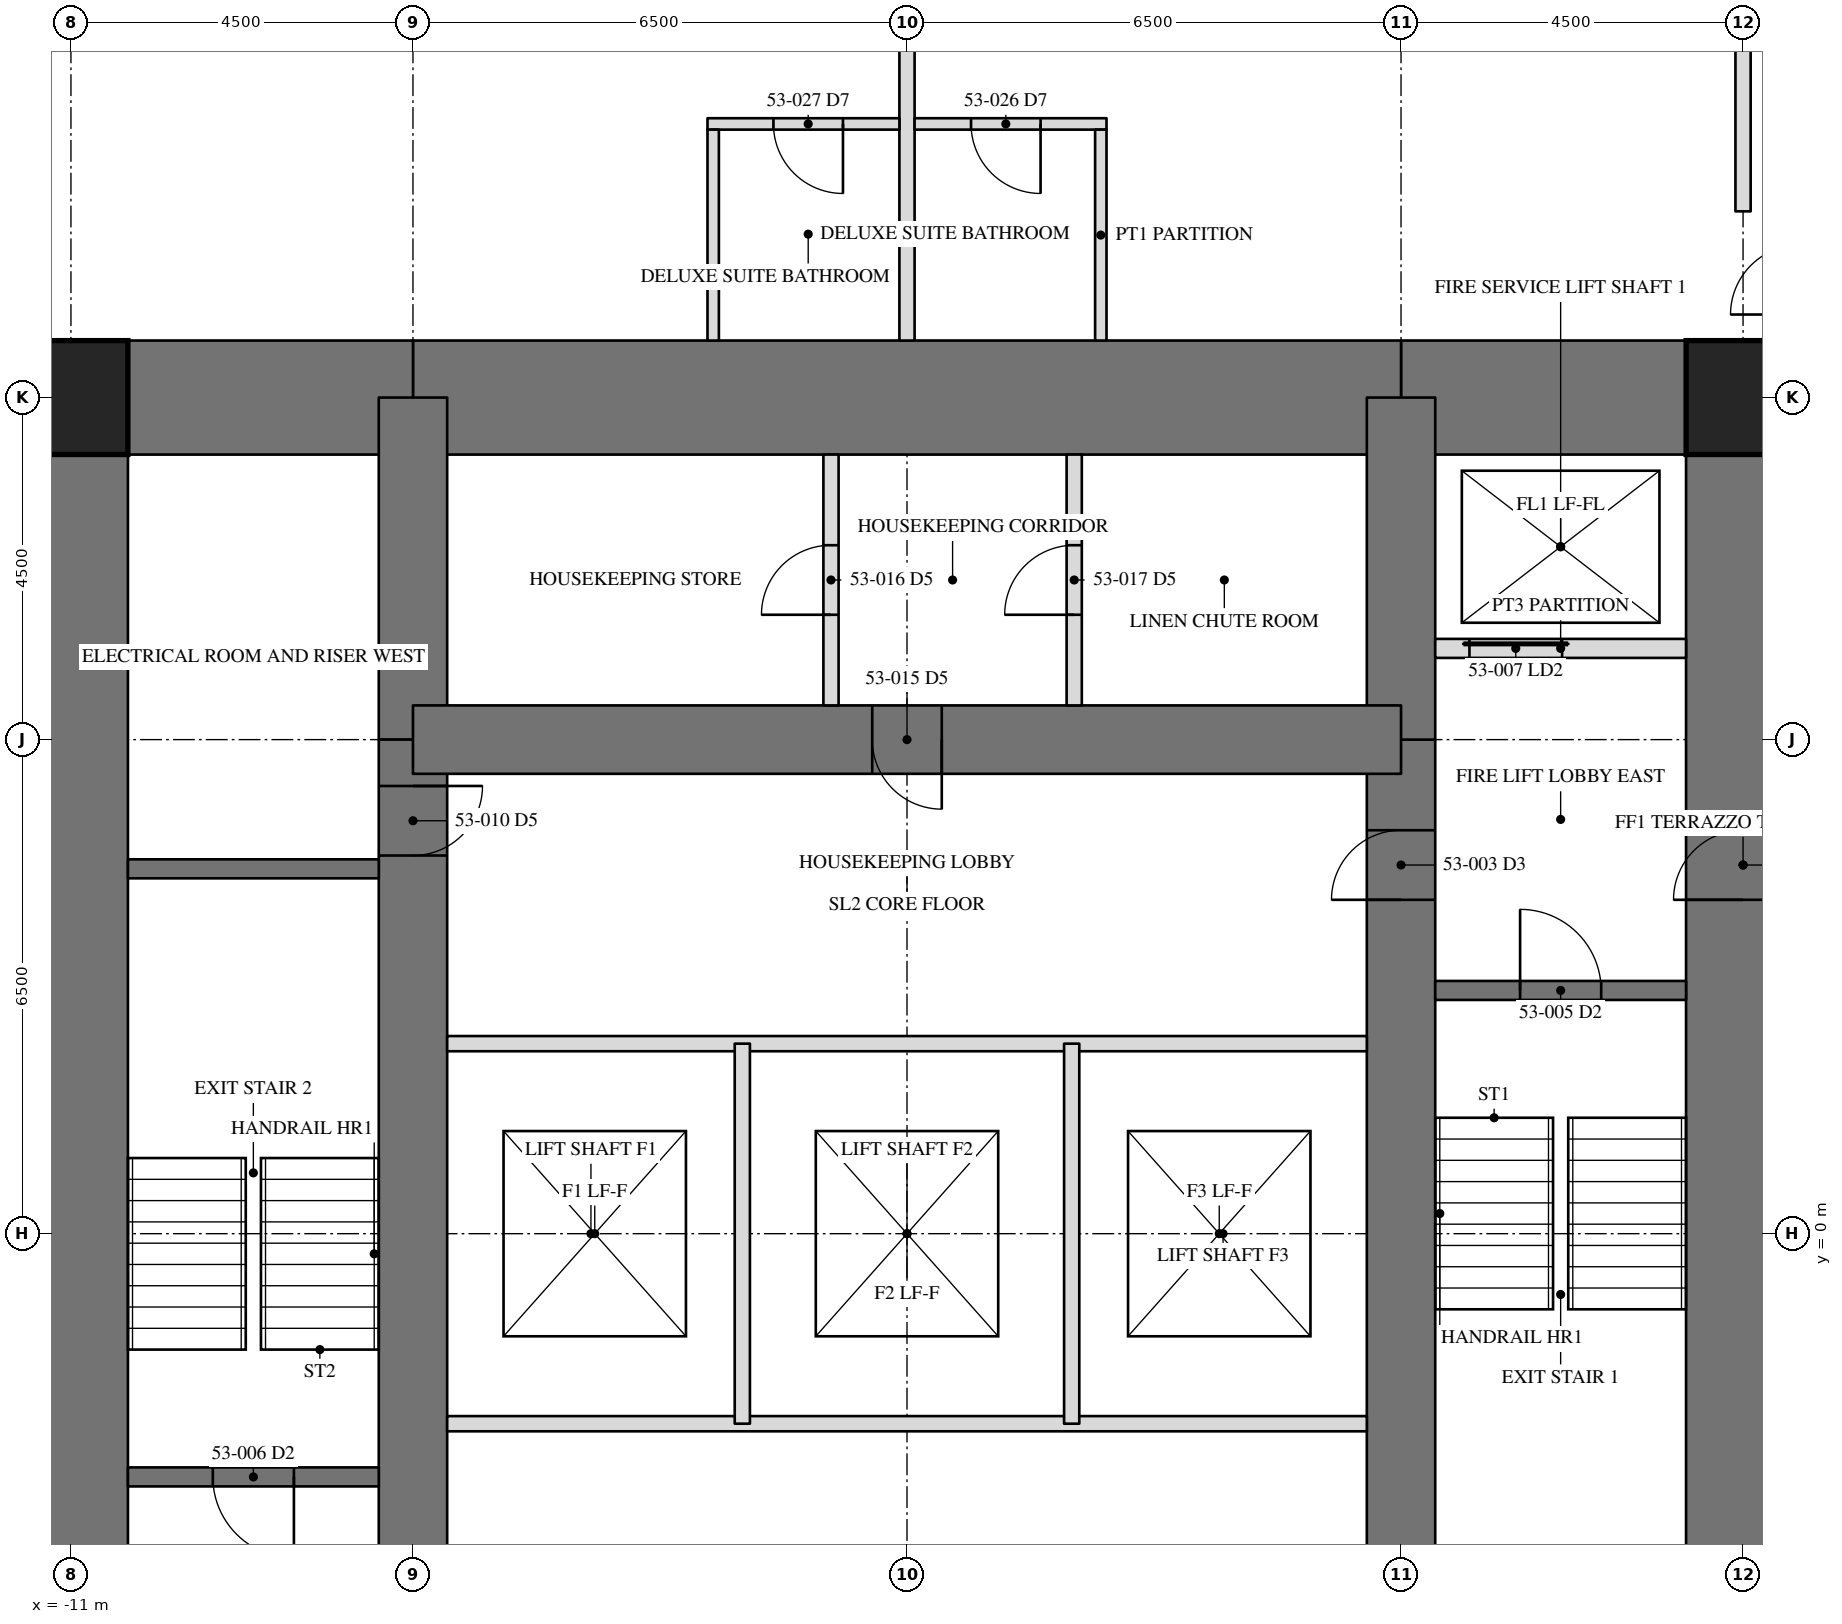
"""IFC4 building model, lengths in metres.
Left out: names, types, materials, properties, quantities, classifications, styles, units other than length and angle.
Written with IfcOpenShell. Run it as: python <this file> out.ifc"""

import sys

from ifc_helpers import new_model, si_unit, direction, frame, frame_2d, origin, origin_2d, place, context, subcontext, project, spatial, rectangle, hollow_rectangle, extrude, element, fill, save


model = new_model("IFC4")
c1 = context("Model", 3, precision=1e-05, world=origin(), true_north=direction((0.0, 1.0)))
c2 = subcontext(c1, "Body", "Model", "MODEL_VIEW")
j1 = project(units=[si_unit("LENGTHUNIT", "METRE"), si_unit("PLANEANGLEUNIT", "RADIAN")], contexts=[c1])
p1 = place(None, origin())
s1 = spatial("IfcSite", under=j1, at=p1, CompositionType="ELEMENT")
p2 = place(p1, origin())
s2 = spatial("IfcBuilding", under=s1, at=p2, CompositionType="ELEMENT")
p3 = place(p2, frame((0.0, 0.0, 222.2)))
s3 = spatial("IfcBuildingStorey", under=s2, at=p3, CompositionType="ELEMENT", Elevation=222.2)
p4 = place(p3, frame((11.0, -11.0, 0.0), z_axis=(0.0, 0.0, 1.0), x_axis=(0.0, 1.0, 0.0)))
e1 = element("IfcWall", 1, at=p4, inside=s3, PredefinedType="SHEAR", context=c2, shape_type="SweptSolid", body=[
    extrude(rectangle(XDim=22.0, YDim=1.5, at=frame_2d((11.0, 0.0))), origin(), (0.0, 0.0, 1.0), 3.5),
])
p5 = place(p4, frame((15.393, 0.0, 0.0)))
e2 = element("IfcOpeningElement", 2, at=p5, cuts=e1, PredefinedType="OPENING", context=c2, shape_type="SweptSolid", body=[
    extrude(rectangle(XDim=0.915, YDim=2.134, at=frame_2d((0.458, 1.067))), frame((0.0, 0.76, 0.0), z_axis=(0.0, -1.0, 0.0), x_axis=(1.0, 0.0, 0.0)), (0.0, 0.0, 1.0), 1.52),
])
p6 = place(p3, frame((-11.0, 11.0, 0.0), z_axis=(0.0, 0.0, 1.0), x_axis=(0.0, -1.0, 0.0)))
e3 = element("IfcWall", 3, at=p6, inside=s3, PredefinedType="SHEAR", context=c2, shape_type="SweptSolid", body=[
    extrude(rectangle(XDim=22.0, YDim=1.5, at=frame_2d((11.0, 0.0))), origin(), (0.0, 0.0, 1.0), 3.5),
])
p7 = place(p6, frame((15.393, 0.0, 0.0)))
e4 = element("IfcOpeningElement", 4, at=p7, cuts=e3, PredefinedType="OPENING", context=c2, shape_type="SweptSolid", body=[
    extrude(rectangle(XDim=0.915, YDim=2.134, at=frame_2d((0.458, 1.067))), frame((0.0, 0.76, 0.0), z_axis=(0.0, -1.0, 0.0), x_axis=(1.0, 0.0, 0.0)), (0.0, 0.0, 1.0), 1.52),
])
p8 = place(p3, frame((11.0, 11.0, 0.0), z_axis=(0.0, 0.0, 1.0), x_axis=(-1.0, 0.0, 0.0)))
e5 = element("IfcWall", 5, at=p8, inside=s3, PredefinedType="SHEAR", context=c2, shape_type="SweptSolid", body=[
    extrude(rectangle(XDim=4.5, YDim=1.5, at=frame_2d((2.25, 0.0))), origin(), (0.0, 0.0, 1.0), 3.5),
])
p9 = place(p3, frame((6.5, 11.0, 0.0), z_axis=(0.0, 0.0, 1.0), x_axis=(-1.0, 0.0, 0.0)))
e6 = element("IfcWall", 6, at=p9, inside=s3, PredefinedType="SHEAR", context=c2, shape_type="SweptSolid", body=[
    extrude(rectangle(XDim=13.0, YDim=1.5, at=frame_2d((6.5, 0.0))), origin(), (0.0, 0.0, 1.0), 3.5),
])
p10 = place(p3, frame((-6.5, 11.0, 0.0), z_axis=(0.0, 0.0, 1.0), x_axis=(-1.0, 0.0, 0.0)))
e7 = element("IfcWall", 7, at=p10, inside=s3, PredefinedType="SHEAR", context=c2, shape_type="SweptSolid", body=[
    extrude(rectangle(XDim=4.5, YDim=1.5, at=frame_2d((2.25, 0.0))), origin(), (0.0, 0.0, 1.0), 3.5),
])
p11 = place(p3, frame((6.5, -6.5, 0.0), z_axis=(0.0, 0.0, 1.0), x_axis=(0.0, 1.0, 0.0)))
e8 = element("IfcWall", 8, at=p11, inside=s3, PredefinedType="SHEAR", context=c2, shape_type="SweptSolid", body=[
    extrude(rectangle(XDim=13.0, YDim=0.9, at=frame_2d((6.5, 0.0))), origin(), (0.0, 0.0, 1.0), 3.5),
])
p12 = place(p11, frame((10.893, 0.0, 0.0)))
e9 = element("IfcOpeningElement", 9, at=p12, cuts=e8, PredefinedType="OPENING", context=c2, shape_type="SweptSolid", body=[
    extrude(rectangle(XDim=0.915, YDim=2.134, at=frame_2d((0.458, 1.067))), frame((0.0, 0.46, 0.0), z_axis=(0.0, -1.0, 0.0), x_axis=(1.0, 0.0, 0.0)), (0.0, 0.0, 1.0), 0.92),
])
p13 = place(p11, frame((0.61, 0.0, 0.0)))
e10 = element("IfcOpeningElement", 10, at=p13, cuts=e8, PredefinedType="OPENING", context=c2, shape_type="SweptSolid", body=[
    extrude(rectangle(XDim=0.915, YDim=2.134, at=frame_2d((0.458, 1.067))), frame((0.0, 0.46, 0.0), z_axis=(0.0, -1.0, 0.0), x_axis=(1.0, 0.0, 0.0)), (0.0, 0.0, 1.0), 0.92),
])
for number, where, z_axis, x_axis in (
    (11, (6.5, 6.5, 0.0), (0.0, 0.0, 1.0), (0.0, 1.0, 0.0)),
    (12, (-6.5, 11.0, 0.0), (0.0, 0.0, 1.0), (0.0, -1.0, 0.0)),
):
    element("IfcWall", number, at=place(p3, frame(where, z_axis=z_axis, x_axis=x_axis)), inside=s3, PredefinedType="SHEAR", context=c2, shape_type="SweptSolid", body=[
        extrude(rectangle(XDim=4.5, YDim=0.9, at=frame_2d((2.25, 0.0))), origin(), (0.0, 0.0, 1.0), 3.5),
    ])
p14 = place(p3, frame((-6.5, 6.5, 0.0), z_axis=(0.0, 0.0, 1.0), x_axis=(0.0, -1.0, 0.0)))
e13 = element("IfcWall", 13, at=p14, inside=s3, PredefinedType="SHEAR", context=c2, shape_type="SweptSolid", body=[
    extrude(rectangle(XDim=13.0, YDim=0.9, at=frame_2d((6.5, 0.0))), origin(), (0.0, 0.0, 1.0), 3.5),
])
p15 = place(p14, frame((10.893, 0.0, 0.0)))
e14 = element("IfcOpeningElement", 14, at=p15, cuts=e13, PredefinedType="OPENING", context=c2, shape_type="SweptSolid", body=[
    extrude(rectangle(XDim=0.915, YDim=2.134, at=frame_2d((0.458, 1.067))), frame((0.0, 0.46, 0.0), z_axis=(0.0, -1.0, 0.0), x_axis=(1.0, 0.0, 0.0)), (0.0, 0.0, 1.0), 0.92),
])
p16 = place(p14, frame((0.61, 0.0, 0.0)))
e15 = element("IfcOpeningElement", 15, at=p16, cuts=e13, PredefinedType="OPENING", context=c2, shape_type="SweptSolid", body=[
    extrude(rectangle(XDim=0.915, YDim=2.134, at=frame_2d((0.458, 1.067))), frame((0.0, 0.46, 0.0), z_axis=(0.0, -1.0, 0.0), x_axis=(1.0, 0.0, 0.0)), (0.0, 0.0, 1.0), 0.92),
])
p17 = place(p3, frame((6.5, 6.5, 0.0), z_axis=(0.0, 0.0, 1.0), x_axis=(-1.0, 0.0, 0.0)))
e16 = element("IfcWall", 16, at=p17, inside=s3, PredefinedType="SHEAR", context=c2, shape_type="SweptSolid", body=[
    extrude(rectangle(XDim=13.0, YDim=0.9, at=frame_2d((6.5, 0.0))), origin(), (0.0, 0.0, 1.0), 3.5),
])
p18 = place(p17, frame((6.042, 0.0, 0.0)))
e17 = element("IfcOpeningElement", 17, at=p18, cuts=e16, PredefinedType="OPENING", context=c2, shape_type="SweptSolid", body=[
    extrude(rectangle(XDim=0.915, YDim=2.134, at=frame_2d((0.458, 1.067))), frame((0.0, 0.46, 0.0), z_axis=(0.0, -1.0, 0.0), x_axis=(1.0, 0.0, 0.0)), (0.0, 0.0, 1.0), 0.92),
])
for number, where, z_axis, x_axis in (
    (18, (11.0, 11.0, 0.0), (0.0, 0.0, 1.0), (1.0, 0.0, 0.0)),
    (19, (-11.0, 11.0, 0.0), (0.0, 0.0, 1.0), (1.0, 0.0, 0.0)),
):
    element("IfcColumn", number, at=place(p3, frame(where, z_axis=z_axis, x_axis=x_axis)), inside=s3, PredefinedType="COLUMN", context=c2, shape_type="SweptSolid", body=[
        extrude(hollow_rectangle(XDim=1.499, YDim=1.499, WallThickness=0.102, at=origin_2d()), origin(), (0.0, 0.0, 1.0), 3.5),
    ])
p19 = place(p3, frame((-6.95, 4.8, 0.0), z_axis=(0.0, 0.0, 1.0), x_axis=(-1.0, 0.0, 0.0)))
e20 = element("IfcWall", 20, at=p19, inside=s3, PredefinedType="SOLIDWALL", context=c2, shape_type="SweptSolid", body=[
    extrude(rectangle(XDim=3.3, YDim=0.25, at=frame_2d((1.65, 0.0))), origin(), (0.0, 0.0, 1.0), 3.31),
])
p20 = place(p3, frame((6.95, 3.2, 0.0), z_axis=(0.0, 0.0, 1.0), x_axis=(1.0, 0.0, 0.0)))
e21 = element("IfcWall", 21, at=p20, inside=s3, PredefinedType="SOLIDWALL", context=c2, shape_type="SweptSolid", body=[
    extrude(rectangle(XDim=3.3, YDim=0.25, at=frame_2d((1.65, 0.0))), origin(), (0.0, 0.0, 1.0), 3.31),
])
p21 = place(p20, frame((1.116, 0.0, 0.0)))
e22 = element("IfcOpeningElement", 22, at=p21, cuts=e21, PredefinedType="OPENING", context=c2, shape_type="SweptSolid", body=[
    extrude(rectangle(XDim=1.067, YDim=2.134, at=frame_2d((0.533, 1.067))), frame((0.0, 0.135, 0.0), z_axis=(0.0, -1.0, 0.0), x_axis=(1.0, 0.0, 0.0)), (0.0, 0.0, 1.0), 0.27),
])
p22 = place(p3, frame((-6.95, -3.2, 0.0), z_axis=(0.0, 0.0, 1.0), x_axis=(-1.0, 0.0, 0.0)))
e23 = element("IfcWall", 23, at=p22, inside=s3, PredefinedType="SOLIDWALL", context=c2, shape_type="SweptSolid", body=[
    extrude(rectangle(XDim=3.3, YDim=0.25, at=frame_2d((1.65, 0.0))), origin(), (0.0, 0.0, 1.0), 3.31),
])
p23 = place(p22, frame((1.116, 0.0, 0.0)))
e24 = element("IfcOpeningElement", 24, at=p23, cuts=e23, PredefinedType="OPENING", context=c2, shape_type="SweptSolid", body=[
    extrude(rectangle(XDim=1.067, YDim=2.134, at=frame_2d((0.533, 1.067))), frame((0.0, 0.135, 0.0), z_axis=(0.0, -1.0, 0.0), x_axis=(1.0, 0.0, 0.0)), (0.0, 0.0, 1.0), 0.27),
])
p24 = place(p3, frame((6.95, 7.7, 0.0), z_axis=(0.0, 0.0, 1.0), x_axis=(1.0, 0.0, 0.0)))
e25 = element("IfcWall", 25, at=p24, inside=s3, PredefinedType="PARTITIONING", context=c2, shape_type="SweptSolid", body=[
    extrude(rectangle(XDim=3.3, YDim=0.25, at=frame_2d((1.65, 0.0))), origin(), (0.0, 0.0, 1.0), 3.31),
])
p25 = place(p24, frame((0.45, 0.0, 0.0)))
e26 = element("IfcOpeningElement", 26, at=p25, cuts=e25, PredefinedType="OPENING", context=c2, shape_type="SweptSolid", body=[
    extrude(rectangle(XDim=1.219, YDim=2.134, at=frame_2d((0.609, 1.067))), frame((0.0, 0.135, 0.0), z_axis=(0.0, -1.0, 0.0), x_axis=(1.0, 0.0, 0.0)), (0.0, 0.0, 1.0), 0.27),
])
for number, where, z_axis, x_axis in (
    (27, (-6.05, 2.5, 0.0), (0.0, 0.0, 1.0), (1.0, 0.0, 0.0)),
    (28, (6.05, -2.5, 0.0), (0.0, 0.0, 1.0), (-1.0, 0.0, 0.0)),
):
    element("IfcWall", number, at=place(p3, frame(where, z_axis=z_axis, x_axis=x_axis)), inside=s3, PredefinedType="PARTITIONING", context=c2, shape_type="SweptSolid", body=[
        extrude(rectangle(XDim=12.1, YDim=0.2, at=frame_2d((6.05, 0.0))), origin(), (0.0, 0.0, 1.0), 3.31),
    ])
for number, where, z_axis, x_axis in (
    (29, (-2.167, -2.5, 0.0), (0.0, 0.0, 1.0), (0.0, 1.0, 0.0)),
    (30, (2.167, -2.5, 0.0), (0.0, 0.0, 1.0), (0.0, 1.0, 0.0)),
):
    element("IfcWall", number, at=place(p3, frame(where, z_axis=z_axis, x_axis=x_axis)), inside=s3, PredefinedType="PARTITIONING", context=c2, shape_type="SweptSolid", body=[
        extrude(rectangle(XDim=5.0, YDim=0.2, at=frame_2d((2.5, 0.0))), origin(), (0.0, 0.0, 1.0), 3.31),
    ])
p26 = place(p3, frame((-1.0, 6.95, 0.0), z_axis=(0.0, 0.0, 1.0), x_axis=(0.0, 1.0, 0.0)))
e31 = element("IfcWall", 31, at=p26, inside=s3, PredefinedType="PARTITIONING", context=c2, shape_type="SweptSolid", body=[
    extrude(rectangle(XDim=3.3, YDim=0.2, at=frame_2d((1.65, 0.0))), origin(), (0.0, 0.0, 1.0), 3.31),
])
p27 = place(p26, frame((1.192, 0.0, 0.0)))
e32 = element("IfcOpeningElement", 32, at=p27, cuts=e31, PredefinedType="OPENING", context=c2, shape_type="SweptSolid", body=[
    extrude(rectangle(XDim=0.915, YDim=2.134, at=frame_2d((0.458, 1.067))), frame((0.0, 0.11, 0.0), z_axis=(0.0, -1.0, 0.0), x_axis=(1.0, 0.0, 0.0)), (0.0, 0.0, 1.0), 0.22),
])
p28 = place(p3, frame((2.2, 6.95, 0.0), z_axis=(0.0, 0.0, 1.0), x_axis=(0.0, 1.0, 0.0)))
e33 = element("IfcWall", 33, at=p28, inside=s3, PredefinedType="PARTITIONING", context=c2, shape_type="SweptSolid", body=[
    extrude(rectangle(XDim=3.3, YDim=0.2, at=frame_2d((1.65, 0.0))), origin(), (0.0, 0.0, 1.0), 3.31),
])
p29 = place(p28, frame((1.192, 0.0, 0.0)))
e34 = element("IfcOpeningElement", 34, at=p29, cuts=e33, PredefinedType="OPENING", context=c2, shape_type="SweptSolid", body=[
    extrude(rectangle(XDim=0.915, YDim=2.134, at=frame_2d((0.458, 1.067))), frame((0.0, 0.11, 0.0), z_axis=(0.0, -1.0, 0.0), x_axis=(1.0, 0.0, 0.0)), (0.0, 0.0, 1.0), 0.22),
])
p30 = place(p3, frame((11.0, 13.45, 0.0), z_axis=(0.0, 0.0, 1.0), x_axis=(0.0, 1.0, 0.0)))
e35 = element("IfcWall", 35, at=p30, inside=s3, PredefinedType="PARTITIONING", context=c2, shape_type="SweptSolid", body=[
    extrude(rectangle(XDim=6.465, YDim=0.2, at=frame_2d((3.232, 0.0))), origin(), (0.0, 0.0, 1.0), 2.802),
])
p31 = place(p3, frame((0.0, 11.75, 0.0), z_axis=(0.0, 0.0, 1.0), x_axis=(0.0, 1.0, 0.0)))
e36 = element("IfcWall", 36, at=p31, inside=s3, PredefinedType="PARTITIONING", context=c2, shape_type="SweptSolid", body=[
    extrude(rectangle(XDim=8.165, YDim=0.2, at=frame_2d((4.083, 0.0))), origin(), (0.0, 0.0, 1.0), 2.802),
])
p32 = place(p3, frame((2.625, 14.6, 0.0), z_axis=(0.0, 0.0, 1.0), x_axis=(-1.0, 0.0, 0.0)))
e37 = element("IfcWall", 37, at=p32, inside=s3, PredefinedType="PARTITIONING", context=c2, shape_type="SweptSolid", body=[
    extrude(rectangle(XDim=2.525, YDim=0.15, at=frame_2d((1.262, 0.0))), origin(), (0.0, 0.0, 1.0), 3.31),
])
p33 = place(p32, frame((0.867, 0.0, 0.0)))
e38 = element("IfcOpeningElement", 38, at=p33, cuts=e37, PredefinedType="OPENING", context=c2, shape_type="SweptSolid", body=[
    extrude(rectangle(XDim=0.915, YDim=2.032, at=frame_2d((0.458, 1.016))), frame((0.0, 0.085, 0.0), z_axis=(0.0, -1.0, 0.0), x_axis=(1.0, 0.0, 0.0)), (0.0, 0.0, 1.0), 0.17),
])
p34 = place(p3, frame((2.55, 11.75, 0.0), z_axis=(0.0, 0.0, 1.0), x_axis=(0.0, 1.0, 0.0)))
e39 = element("IfcWall", 39, at=p34, inside=s3, PredefinedType="PARTITIONING", context=c2, shape_type="SweptSolid", body=[
    extrude(rectangle(XDim=2.775, YDim=0.15, at=frame_2d((1.387, 0.0))), origin(), (0.0, 0.0, 1.0), 3.31),
])
p35 = place(p3, frame((-0.1, 14.6, 0.0), z_axis=(0.0, 0.0, 1.0), x_axis=(-1.0, 0.0, 0.0)))
e40 = element("IfcWall", 40, at=p35, inside=s3, PredefinedType="PARTITIONING", context=c2, shape_type="SweptSolid", body=[
    extrude(rectangle(XDim=2.525, YDim=0.15, at=frame_2d((1.262, 0.0))), origin(), (0.0, 0.0, 1.0), 3.31),
])
p36 = place(p35, frame((0.742, 0.0, 0.0)))
e41 = element("IfcOpeningElement", 41, at=p36, cuts=e40, PredefinedType="OPENING", context=c2, shape_type="SweptSolid", body=[
    extrude(rectangle(XDim=0.915, YDim=2.032, at=frame_2d((0.458, 1.016))), frame((0.0, 0.085, 0.0), z_axis=(0.0, -1.0, 0.0), x_axis=(1.0, 0.0, 0.0)), (0.0, 0.0, 1.0), 0.17),
])
p37 = place(p3, frame((-2.55, 11.75, 0.0), z_axis=(0.0, 0.0, 1.0), x_axis=(0.0, 1.0, 0.0)))
e42 = element("IfcWall", 42, at=p37, inside=s3, PredefinedType="PARTITIONING", context=c2, shape_type="SweptSolid", body=[
    extrude(rectangle(XDim=2.775, YDim=0.15, at=frame_2d((1.387, 0.0))), origin(), (0.0, 0.0, 1.0), 3.31),
])
p38 = place(p12, origin())
e43 = element("IfcDoor", 43, at=p38, inside=s3, OperationType="SINGLE_SWING_RIGHT", PredefinedType="DOOR", context=c2, shape_type="SweptSolid", body=[
    extrude(rectangle(XDim=0.915, YDim=2.134, at=frame_2d((0.458, 1.067))), frame((0.0, -0.375, 0.0), z_axis=(0.0, -1.0, 0.0), x_axis=(1.0, 0.0, 0.0)), (0.0, 0.0, 1.0), 0.05),
])
fill(e9, e43)
p39 = place(p21, origin())
e44 = element("IfcDoor", 44, at=p39, inside=s3, OperationType="SINGLE_SWING_LEFT", PredefinedType="DOOR", context=c2, shape_type="SweptSolid", body=[
    extrude(rectangle(XDim=1.067, YDim=2.134, at=frame_2d((0.533, 1.067))), frame((0.0, 0.025, 0.0), z_axis=(0.0, -1.0, 0.0), x_axis=(1.0, 0.0, 0.0)), (0.0, 0.0, 1.0), 0.05),
])
fill(e22, e44)
p40 = place(p23, origin())
e45 = element("IfcDoor", 45, at=p40, inside=s3, OperationType="SINGLE_SWING_LEFT", PredefinedType="DOOR", context=c2, shape_type="SweptSolid", body=[
    extrude(rectangle(XDim=1.067, YDim=2.134, at=frame_2d((0.533, 1.067))), frame((0.0, 0.025, 0.0), z_axis=(0.0, -1.0, 0.0), x_axis=(1.0, 0.0, 0.0)), (0.0, 0.0, 1.0), 0.05),
])
fill(e24, e45)
p41 = place(p25, origin())
e46 = element("IfcDoor", 46, at=p41, inside=s3, OperationType="SLIDING_TO_LEFT", PredefinedType="DOOR", context=c2, shape_type="SweptSolid", body=[
    extrude(rectangle(XDim=1.219, YDim=2.134, at=frame_2d((0.609, 1.067))), frame((0.0, 0.025, 0.0), z_axis=(0.0, -1.0, 0.0), x_axis=(1.0, 0.0, 0.0)), (0.0, 0.0, 1.0), 0.05),
])
fill(e26, e46)
p42 = place(p16, origin())
e47 = element("IfcDoor", 47, at=p42, inside=s3, OperationType="SINGLE_SWING_RIGHT", PredefinedType="DOOR", context=c2, shape_type="SweptSolid", body=[
    extrude(rectangle(XDim=0.915, YDim=2.134, at=frame_2d((0.458, 1.067))), frame((0.0, -0.375, 0.0), z_axis=(0.0, -1.0, 0.0), x_axis=(1.0, 0.0, 0.0)), (0.0, 0.0, 1.0), 0.05),
])
fill(e15, e47)
p43 = place(p18, origin())
e48 = element("IfcDoor", 48, at=p43, inside=s3, OperationType="SINGLE_SWING_RIGHT", PredefinedType="DOOR", context=c2, shape_type="SweptSolid", body=[
    extrude(rectangle(XDim=0.915, YDim=2.134, at=frame_2d((0.458, 1.067))), frame((0.0, -0.375, 0.0), z_axis=(0.0, -1.0, 0.0), x_axis=(1.0, 0.0, 0.0)), (0.0, 0.0, 1.0), 0.05),
])
fill(e17, e48)
p44 = place(p27, origin())
e49 = element("IfcDoor", 49, at=p44, inside=s3, OperationType="SINGLE_SWING_RIGHT", PredefinedType="DOOR", context=c2, shape_type="SweptSolid", body=[
    extrude(rectangle(XDim=0.915, YDim=2.134, at=frame_2d((0.458, 1.067))), frame((0.0, 0.025, 0.0), z_axis=(0.0, -1.0, 0.0), x_axis=(1.0, 0.0, 0.0)), (0.0, 0.0, 1.0), 0.05),
])
fill(e32, e49)
p45 = place(p29, origin())
e50 = element("IfcDoor", 50, at=p45, inside=s3, OperationType="SINGLE_SWING_RIGHT", PredefinedType="DOOR", context=c2, shape_type="SweptSolid", body=[
    extrude(rectangle(XDim=0.915, YDim=2.134, at=frame_2d((0.458, 1.067))), frame((0.0, 0.025, 0.0), z_axis=(0.0, -1.0, 0.0), x_axis=(1.0, 0.0, 0.0)), (0.0, 0.0, 1.0), 0.05),
])
fill(e34, e50)
p46 = place(p33, origin())
e51 = element("IfcDoor", 51, at=p46, inside=s3, OperationType="SINGLE_SWING_LEFT", PredefinedType="DOOR", context=c2, shape_type="SweptSolid", body=[
    extrude(rectangle(XDim=0.915, YDim=2.032, at=frame_2d((0.458, 1.016))), frame((0.0, 0.025, 0.0), z_axis=(0.0, -1.0, 0.0), x_axis=(1.0, 0.0, 0.0)), (0.0, 0.0, 1.0), 0.05),
])
fill(e38, e51)
p47 = place(p36, origin())
e52 = element("IfcDoor", 52, at=p47, inside=s3, OperationType="SINGLE_SWING_LEFT", PredefinedType="DOOR", context=c2, shape_type="SweptSolid", body=[
    extrude(rectangle(XDim=0.915, YDim=2.032, at=frame_2d((0.458, 1.016))), frame((0.0, 0.025, 0.0), z_axis=(0.0, -1.0, 0.0), x_axis=(1.0, 0.0, 0.0)), (0.0, 0.0, 1.0), 0.05),
])
fill(e41, e52)
save(model, sys.argv[1])
